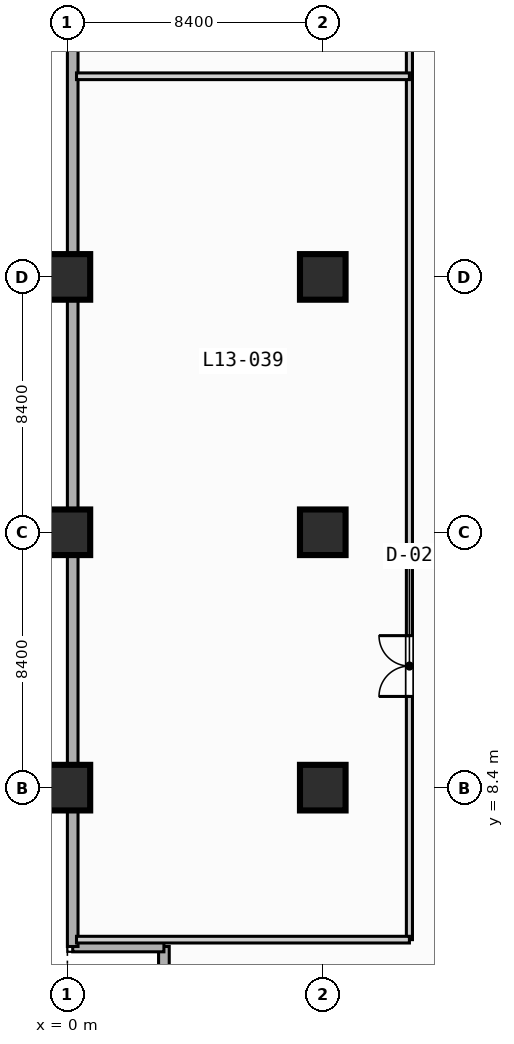
"""IFC4 building model, lengths in metres.
Left out: names, types, materials, properties, quantities, classifications, styles, units other than length and angle.
Written with IfcOpenShell. Run it as: python <this file> out.ifc"""

import sys

from ifc_helpers import new_model, si_unit, direction, frame, frame_2d, origin, origin_2d, place, context, subcontext, project, spatial, rectangle, extrude, element, fill, save


model = new_model("IFC4")
c1 = context("Model", 3, precision=1e-05, world=origin(), true_north=direction((0.0, 1.0)))
c2 = subcontext(c1, "Body", "Model", "MODEL_VIEW")
j1 = project(units=[si_unit("LENGTHUNIT", "METRE"), si_unit("PLANEANGLEUNIT", "RADIAN")], contexts=[c1])
p1 = place(None, origin())
s1 = spatial("IfcSite", under=j1, at=p1, CompositionType="ELEMENT")
p2 = place(p1, origin())
s2 = spatial("IfcBuilding", under=s1, at=p2, CompositionType="ELEMENT")
p3 = place(p2, frame((0.0, 0.0, 58.6)))
s3 = spatial("IfcBuildingStorey", under=s2, at=p3, CompositionType="ELEMENT", Elevation=58.6)
for number, where, z_axis, x_axis in (
    (1, (0.0, 8.4, 0.0), (0.0, 0.0, 1.0), (1.0, 0.0, 0.0)),
    (2, (0.0, 16.8, 0.0), (0.0, 0.0, 1.0), (1.0, 0.0, 0.0)),
    (3, (0.0, 25.2, 0.0), (0.0, 0.0, 1.0), (1.0, 0.0, 0.0)),
    (4, (8.4, 8.4, 0.0), (0.0, 0.0, 1.0), (1.0, 0.0, 0.0)),
    (5, (8.4, 16.8, 0.0), (0.0, 0.0, 1.0), (1.0, 0.0, 0.0)),
    (6, (8.4, 25.2, 0.0), (0.0, 0.0, 1.0), (1.0, 0.0, 0.0)),
):
    element("IfcColumn", number, at=place(p3, frame(where, z_axis=z_axis, x_axis=x_axis)), inside=s3, PredefinedType="COLUMN", context=c2, shape_type="SweptSolid", body=[
        extrude(rectangle(XDim=1.5, YDim=1.5, at=origin_2d()), origin(), (0.0, 0.0, 1.0), 3.8),
    ])
for number, where, z_axis, x_axis in (
    (7, (3.175, 0.175, 0.0), (0.0, 0.0, 1.0), (0.0, 1.0, 0.0)),
    (8, (3.175, 3.175, 0.0), (0.0, 0.0, 1.0), (-1.0, 0.0, 0.0)),
):
    element("IfcWall", number, at=place(p3, frame(where, z_axis=z_axis, x_axis=x_axis)), inside=s3, PredefinedType="STANDARD", context=c2, shape_type="SweptSolid", body=[
        extrude(rectangle(XDim=3.0, YDim=0.35, at=frame_2d((1.5, 0.0))), origin(), (0.0, 0.0, 1.0), 3.55),
    ])
p4 = place(p3, frame((0.175, 3.175, 0.0), z_axis=(0.0, 0.0, 1.0), x_axis=(0.0, 1.0, 0.0)))
e9 = element("IfcWall", 9, at=p4, inside=s3, PredefinedType="STANDARD", context=c2, shape_type="SweptSolid", body=[
    extrude(rectangle(XDim=86.05, YDim=0.35, at=frame_2d((43.025, 0.0))), origin(), (0.0, 0.0, 1.0), 3.55),
])
p5 = place(p4, frame((42.325, 0.0, 0.0)))
e10 = element("IfcOpeningElement", 10, at=p5, cuts=e9, PredefinedType="OPENING", context=c2, shape_type="SweptSolid", body=[
    extrude(rectangle(XDim=1.4, YDim=2.2, at=frame_2d((0.7, 1.1))), frame((0.0, 0.185, 0.0), z_axis=(0.0, -1.0, 0.0), x_axis=(1.0, 0.0, 0.0)), (0.0, 0.0, 1.0), 0.37),
])
p6 = place(p4, frame((33.525, 0.0, 0.85)))
e11 = element("IfcOpeningElement", 11, at=p6, cuts=e9, PredefinedType="OPENING", context=c2, shape_type="SweptSolid", body=[
    extrude(rectangle(XDim=2.2, YDim=1.8, at=frame_2d((1.1, 0.9))), frame((0.0, 0.185, 0.0), z_axis=(0.0, -1.0, 0.0), x_axis=(1.0, 0.0, 0.0)), (0.0, 0.0, 1.0), 0.37),
])
p7 = place(p4, frame((50.325, 0.0, 0.85)))
e12 = element("IfcOpeningElement", 12, at=p7, cuts=e9, PredefinedType="OPENING", context=c2, shape_type="SweptSolid", body=[
    extrude(rectangle(XDim=2.2, YDim=1.8, at=frame_2d((1.1, 0.9))), frame((0.0, 0.185, 0.0), z_axis=(0.0, -1.0, 0.0), x_axis=(1.0, 0.0, 0.0)), (0.0, 0.0, 1.0), 0.37),
])
p8 = place(p4, frame((58.725, 0.0, 0.85)))
e13 = element("IfcOpeningElement", 13, at=p8, cuts=e9, PredefinedType="OPENING", context=c2, shape_type="SweptSolid", body=[
    extrude(rectangle(XDim=2.2, YDim=1.8, at=frame_2d((1.1, 0.9))), frame((0.0, 0.185, 0.0), z_axis=(0.0, -1.0, 0.0), x_axis=(1.0, 0.0, 0.0)), (0.0, 0.0, 1.0), 0.37),
])
p9 = place(p4, frame((67.125, 0.0, 0.85)))
e14 = element("IfcOpeningElement", 14, at=p9, cuts=e9, PredefinedType="OPENING", context=c2, shape_type="SweptSolid", body=[
    extrude(rectangle(XDim=2.2, YDim=1.8, at=frame_2d((1.1, 0.9))), frame((0.0, 0.185, 0.0), z_axis=(0.0, -1.0, 0.0), x_axis=(1.0, 0.0, 0.0)), (0.0, 0.0, 1.0), 0.37),
])
p10 = place(p4, frame((75.525, 0.0, 0.85)))
e15 = element("IfcOpeningElement", 15, at=p10, cuts=e9, PredefinedType="OPENING", context=c2, shape_type="SweptSolid", body=[
    extrude(rectangle(XDim=2.2, YDim=1.8, at=frame_2d((1.1, 0.9))), frame((0.0, 0.185, 0.0), z_axis=(0.0, -1.0, 0.0), x_axis=(1.0, 0.0, 0.0)), (0.0, 0.0, 1.0), 0.37),
])
p11 = place(p3, frame((11.25, 3.4, 0.0), z_axis=(0.0, 0.0, 1.0), x_axis=(0.0, 1.0, 0.0)))
e16 = element("IfcWall", 16, at=p11, inside=s3, PredefinedType="PARTITIONING", context=c2, shape_type="SweptSolid", body=[
    extrude(rectangle(XDim=85.4, YDim=0.2, at=frame_2d((42.7, 0.0))), origin(), (0.0, 0.0, 1.0), 3.55),
])
p12 = place(p11, frame((8.0, 0.0, 0.0)))
e17 = element("IfcOpeningElement", 17, at=p12, cuts=e16, PredefinedType="OPENING", context=c2, shape_type="SweptSolid", body=[
    extrude(rectangle(XDim=2.0, YDim=2.15, at=frame_2d((1.0, 1.075))), frame((0.0, 0.11, 0.0), z_axis=(0.0, -1.0, 0.0), x_axis=(1.0, 0.0, 0.0)), (0.0, 0.0, 1.0), 0.22),
])
p13 = place(p11, frame((36.0, 0.0, 0.0)))
e18 = element("IfcOpeningElement", 18, at=p13, cuts=e16, PredefinedType="OPENING", context=c2, shape_type="SweptSolid", body=[
    extrude(rectangle(XDim=2.0, YDim=2.15, at=frame_2d((1.0, 1.075))), frame((0.0, 0.11, 0.0), z_axis=(0.0, -1.0, 0.0), x_axis=(1.0, 0.0, 0.0)), (0.0, 0.0, 1.0), 0.22),
])
for number, where, z_axis, x_axis in (
    (19, (0.3, 3.4, 0.0), (0.0, 0.0, 1.0), (1.0, 0.0, 0.0)),
    (20, (0.3, 31.8, 0.0), (0.0, 0.0, 1.0), (1.0, 0.0, 0.0)),
):
    element("IfcWall", number, at=place(p3, frame(where, z_axis=z_axis, x_axis=x_axis)), inside=s3, PredefinedType="PARTITIONING", context=c2, shape_type="SweptSolid", body=[
        extrude(rectangle(XDim=10.95, YDim=0.22, at=frame_2d((5.475, 0.0))), origin(), (0.0, 0.0, 1.0), 3.55),
    ])
p14 = place(p12, origin())
e21 = element("IfcDoor", 21, at=p14, inside=s3, OperationType="SINGLE_SWING_LEFT", PredefinedType="DOOR", context=c2, shape_type="SweptSolid", body=[
    extrude(rectangle(XDim=2.0, YDim=2.15, at=frame_2d((1.0, 1.075))), frame((0.0, 0.025, 0.0), z_axis=(0.0, -1.0, 0.0), x_axis=(1.0, 0.0, 0.0)), (0.0, 0.0, 1.0), 0.05),
])
fill(e17, e21)
save(model, sys.argv[1])
